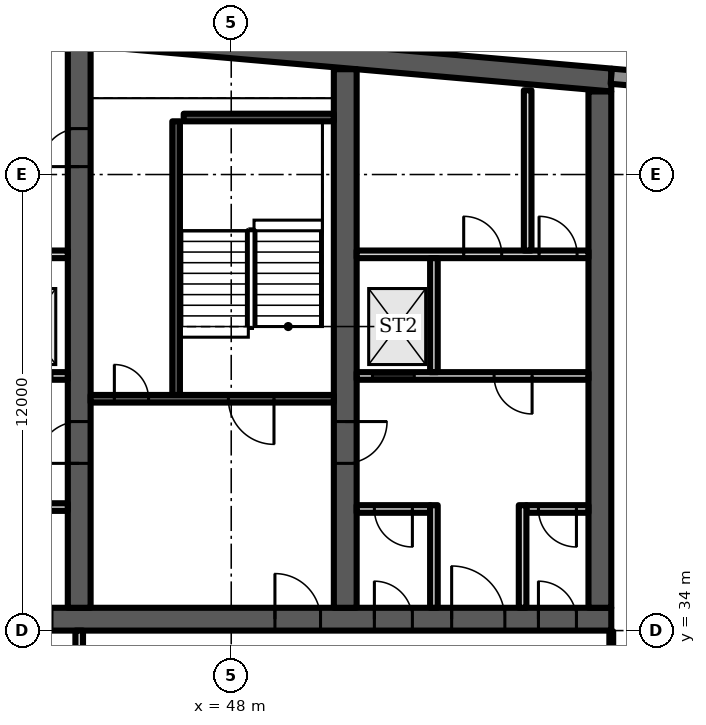
"""IFC4 building model, lengths in metres.
Left out: names, types, materials, properties, quantities, classifications, styles, units other than length and angle.
Written with IfcOpenShell. Run it as: python <this file> out.ifc"""

import sys

from ifc_helpers import new_model, si_unit, direction, frame, frame_2d, origin, place, context, subcontext, project, spatial, polyline, rectangle, outline, extrude, element, fill, save


model = new_model("IFC4")
c1 = context("Model", 3, precision=1e-05, world=origin(), true_north=direction((0.0, 1.0)))
c2 = subcontext(c1, "Body", "Model", "MODEL_VIEW")
j1 = project(units=[si_unit("LENGTHUNIT", "METRE"), si_unit("PLANEANGLEUNIT", "RADIAN")], contexts=[c1])
p1 = place(None, origin())
s1 = spatial("IfcSite", under=j1, at=p1, CompositionType="ELEMENT")
p2 = place(p1, origin())
s2 = spatial("IfcBuilding", under=s1, at=p2, CompositionType="ELEMENT")
p3 = place(p2, frame((0.0, 0.0, 207.1)))
s3 = spatial("IfcBuildingStorey", under=s2, at=p3, CompositionType="ELEMENT", Elevation=207.1)
p4 = place(p3, frame((0.0, 0.0, -0.0)))
e1 = element("IfcWall", 1, at=p4, inside=s3, PredefinedType="SHEAR", context=c2, shape_type="SweptSolid", body=[
    extrude(outline(polyline([(23.0, 48.185), (40.5, 49.716), (58.0, 48.185), (58.0, 48.787), (40.5, 50.318), (23.0, 48.787), (23.0, 48.185)])), origin(), (0.0, 0.0, 1.0), 3.6),
])
p5 = place(p3, frame((23.0, 34.3, 0.0), z_axis=(0.0, 0.0, 1.0), x_axis=(1.0, 0.0, 0.0)))
e2 = element("IfcWall", 2, at=p5, inside=s3, PredefinedType="SHEAR", context=c2, shape_type="SweptSolid", body=[
    extrude(rectangle(XDim=35.0, YDim=0.6, at=frame_2d((17.5, 0.0))), origin(), (0.0, 0.0, 1.0), 3.6),
])
p6 = place(p5, frame((0.65, 0.0, 0.0)))
e3 = element("IfcOpeningElement", 3, at=p6, cuts=e2, PredefinedType="OPENING", context=c2, shape_type="SweptSolid", body=[
    extrude(rectangle(XDim=1.2, YDim=2.1, at=frame_2d((0.6, 1.05))), frame((0.0, 0.31, 0.0), z_axis=(0.0, -1.0, 0.0), x_axis=(1.0, 0.0, 0.0)), (0.0, 0.0, 1.0), 0.62),
])
p7 = place(p5, frame((7.717, 0.0, 0.0)))
e4 = element("IfcOpeningElement", 4, at=p7, cuts=e2, PredefinedType="OPENING", context=c2, shape_type="SweptSolid", body=[
    extrude(rectangle(XDim=1.1, YDim=2.1, at=frame_2d((0.55, 1.05))), frame((0.0, 0.31, 0.0), z_axis=(0.0, -1.0, 0.0), x_axis=(1.0, 0.0, 0.0)), (0.0, 0.0, 1.0), 0.62),
])
p8 = place(p5, frame((12.183, 0.0, 0.0)))
e5 = element("IfcOpeningElement", 5, at=p8, cuts=e2, PredefinedType="OPENING", context=c2, shape_type="SweptSolid", body=[
    extrude(rectangle(XDim=1.1, YDim=2.1, at=frame_2d((0.55, 1.05))), frame((0.0, 0.31, 0.0), z_axis=(0.0, -1.0, 0.0), x_axis=(1.0, 0.0, 0.0)), (0.0, 0.0, 1.0), 0.62),
])
p9 = place(p5, frame((9.8, 0.0, 0.0)))
e6 = element("IfcOpeningElement", 6, at=p9, cuts=e2, PredefinedType="OPENING", context=c2, shape_type="SweptSolid", body=[
    extrude(rectangle(XDim=1.4, YDim=2.1, at=frame_2d((0.7, 1.05))), frame((0.0, 0.31, 0.0), z_axis=(0.0, -1.0, 0.0), x_axis=(1.0, 0.0, 0.0)), (0.0, 0.0, 1.0), 0.62),
])
p10 = place(p5, frame((14.717, 0.0, 0.0)))
e7 = element("IfcOpeningElement", 7, at=p10, cuts=e2, PredefinedType="OPENING", context=c2, shape_type="SweptSolid", body=[
    extrude(rectangle(XDim=1.1, YDim=2.1, at=frame_2d((0.55, 1.05))), frame((0.0, 0.31, 0.0), z_axis=(0.0, -1.0, 0.0), x_axis=(1.0, 0.0, 0.0)), (0.0, 0.0, 1.0), 0.62),
])
p11 = place(p5, frame((16.95, 0.0, 0.0)))
e8 = element("IfcOpeningElement", 8, at=p11, cuts=e2, PredefinedType="OPENING", context=c2, shape_type="SweptSolid", body=[
    extrude(rectangle(XDim=1.1, YDim=2.1, at=frame_2d((0.55, 1.05))), frame((0.0, 0.31, 0.0), z_axis=(0.0, -1.0, 0.0), x_axis=(1.0, 0.0, 0.0)), (0.0, 0.0, 1.0), 0.62),
])
p12 = place(p5, frame((19.183, 0.0, 0.0)))
e9 = element("IfcOpeningElement", 9, at=p12, cuts=e2, PredefinedType="OPENING", context=c2, shape_type="SweptSolid", body=[
    extrude(rectangle(XDim=1.1, YDim=2.1, at=frame_2d((0.55, 1.05))), frame((0.0, 0.31, 0.0), z_axis=(0.0, -1.0, 0.0), x_axis=(1.0, 0.0, 0.0)), (0.0, 0.0, 1.0), 0.62),
])
p13 = place(p5, frame((26.15, 0.0, 0.0)))
e10 = element("IfcOpeningElement", 10, at=p13, cuts=e2, PredefinedType="OPENING", context=c2, shape_type="SweptSolid", body=[
    extrude(rectangle(XDim=1.2, YDim=2.1, at=frame_2d((0.6, 1.05))), frame((0.0, 0.31, 0.0), z_axis=(0.0, -1.0, 0.0), x_axis=(1.0, 0.0, 0.0)), (0.0, 0.0, 1.0), 0.62),
])
p14 = place(p5, frame((28.767, 0.0, 0.0)))
e11 = element("IfcOpeningElement", 11, at=p14, cuts=e2, PredefinedType="OPENING", context=c2, shape_type="SweptSolid", body=[
    extrude(rectangle(XDim=1.0, YDim=2.1, at=frame_2d((0.5, 1.05))), frame((0.0, 0.31, 0.0), z_axis=(0.0, -1.0, 0.0), x_axis=(1.0, 0.0, 0.0)), (0.0, 0.0, 1.0), 0.62),
])
p15 = place(p5, frame((33.083, 0.0, 0.0)))
e12 = element("IfcOpeningElement", 12, at=p15, cuts=e2, PredefinedType="OPENING", context=c2, shape_type="SweptSolid", body=[
    extrude(rectangle(XDim=1.0, YDim=2.1, at=frame_2d((0.5, 1.05))), frame((0.0, 0.31, 0.0), z_axis=(0.0, -1.0, 0.0), x_axis=(1.0, 0.0, 0.0)), (0.0, 0.0, 1.0), 0.62),
])
p16 = place(p5, frame((30.8, 0.0, 0.0)))
e13 = element("IfcOpeningElement", 13, at=p16, cuts=e2, PredefinedType="OPENING", context=c2, shape_type="SweptSolid", body=[
    extrude(rectangle(XDim=1.4, YDim=2.1, at=frame_2d((0.7, 1.05))), frame((0.0, 0.31, 0.0), z_axis=(0.0, -1.0, 0.0), x_axis=(1.0, 0.0, 0.0)), (0.0, 0.0, 1.0), 0.62),
])
p17 = place(p3, frame((44.0, 34.6, 0.0), z_axis=(0.0, 0.0, 1.0), x_axis=(0.0, 1.0, 0.0)))
e14 = element("IfcWall", 14, at=p17, inside=s3, PredefinedType="SHEAR", context=c2, shape_type="SweptSolid", body=[
    extrude(rectangle(XDim=14.784, YDim=0.6, at=frame_2d((7.392, 0.0))), origin(), (0.0, 0.0, 1.0), 3.6),
])
p18 = place(p17, frame((11.608, 0.0, 0.0)))
e15 = element("IfcOpeningElement", 15, at=p18, cuts=e14, PredefinedType="OPENING", context=c2, shape_type="SweptSolid", body=[
    extrude(rectangle(XDim=1.0, YDim=2.1, at=frame_2d((0.5, 1.05))), frame((0.0, 0.31, 0.0), z_axis=(0.0, -1.0, 0.0), x_axis=(1.0, 0.0, 0.0)), (0.0, 0.0, 1.0), 0.62),
])
p19 = place(p17, frame((3.8, 0.0, 0.0)))
e16 = element("IfcOpeningElement", 16, at=p19, cuts=e14, PredefinedType="OPENING", context=c2, shape_type="SweptSolid", body=[
    extrude(rectangle(XDim=1.1, YDim=2.1, at=frame_2d((0.55, 1.05))), frame((0.0, 0.31, 0.0), z_axis=(0.0, -1.0, 0.0), x_axis=(1.0, 0.0, 0.0)), (0.0, 0.0, 1.0), 0.62),
])
p20 = place(p3, frame((51.0, 34.6, 0.0), z_axis=(0.0, 0.0, 1.0), x_axis=(0.0, 1.0, 0.0)))
e17 = element("IfcWall", 17, at=p20, inside=s3, PredefinedType="SHEAR", context=c2, shape_type="SweptSolid", body=[
    extrude(rectangle(XDim=14.171, YDim=0.6, at=frame_2d((7.085, 0.0))), origin(), (0.0, 0.0, 1.0), 3.6),
])
p21 = place(p20, frame((3.8, 0.0, 0.0)))
e18 = element("IfcOpeningElement", 18, at=p21, cuts=e17, PredefinedType="OPENING", context=c2, shape_type="SweptSolid", body=[
    extrude(rectangle(XDim=1.1, YDim=2.1, at=frame_2d((0.55, 1.05))), frame((0.0, 0.31, 0.0), z_axis=(0.0, -1.0, 0.0), x_axis=(1.0, 0.0, 0.0)), (0.0, 0.0, 1.0), 0.62),
])
p22 = place(p3, frame((57.7, 34.6, 0.0), z_axis=(0.0, 0.0, 1.0), x_axis=(0.0, 1.0, 0.0)))
e19 = element("IfcWall", 19, at=p22, inside=s3, PredefinedType="SHEAR", context=c2, shape_type="SweptSolid", body=[
    extrude(rectangle(XDim=13.585, YDim=0.6, at=frame_2d((6.792, 0.0))), origin(), (0.0, 0.0, 1.0), 3.6),
])
p23 = place(p3, frame((60.983, 48.326, 0.0), z_axis=(0.0, 0.0, 1.0), x_axis=(-0.996194, 0.087168, 0.0)))
e20 = element("IfcWall", 20, at=p23, inside=s3, PredefinedType="SOLIDWALL", context=c2, shape_type="SweptSolid", body=[
    extrude(rectangle(XDim=2.994, YDim=0.4, at=frame_2d((1.497, 0.0))), origin(), (0.0, 0.0, 1.0), 3.2),
])
p24 = place(p3, frame((37.3, 40.7, 0.0), z_axis=(0.0, 0.0, 1.0), x_axis=(1.0, 0.0, 0.0)))
e21 = element("IfcWall", 21, at=p24, inside=s3, PredefinedType="PARTITIONING", context=c2, shape_type="SweptSolid", body=[
    extrude(rectangle(XDim=6.4, YDim=0.2, at=frame_2d((3.2, 0.0))), origin(), (0.0, 0.0, 1.0), 3.2),
])
p25 = place(p24, frame((0.417, 0.0, 0.0)))
e22 = element("IfcOpeningElement", 22, at=p25, cuts=e21, PredefinedType="OPENING", context=c2, shape_type="SweptSolid", body=[
    extrude(rectangle(XDim=1.1, YDim=2.1, at=frame_2d((0.55, 1.05))), frame((0.0, 0.11, 0.0), z_axis=(0.0, -1.0, 0.0), x_axis=(1.0, 0.0, 0.0)), (0.0, 0.0, 1.0), 0.22),
])
p26 = place(p24, frame((2.65, 0.0, 0.0)))
e23 = element("IfcOpeningElement", 23, at=p26, cuts=e21, PredefinedType="OPENING", context=c2, shape_type="SweptSolid", body=[
    extrude(rectangle(XDim=1.1, YDim=2.1, at=frame_2d((0.55, 1.05))), frame((0.0, 0.11, 0.0), z_axis=(0.0, -1.0, 0.0), x_axis=(1.0, 0.0, 0.0)), (0.0, 0.0, 1.0), 0.22),
])
p27 = place(p24, frame((4.883, 0.0, 0.0)))
e24 = element("IfcOpeningElement", 24, at=p27, cuts=e21, PredefinedType="OPENING", context=c2, shape_type="SweptSolid", body=[
    extrude(rectangle(XDim=1.1, YDim=2.1, at=frame_2d((0.55, 1.05))), frame((0.0, 0.11, 0.0), z_axis=(0.0, -1.0, 0.0), x_axis=(1.0, 0.0, 0.0)), (0.0, 0.0, 1.0), 0.22),
])
p28 = place(p3, frame((0.0, 0.0, -0.0)))
e25 = element("IfcWall", 25, at=p28, inside=s3, PredefinedType="PARTITIONING", context=c2, shape_type="SweptSolid", body=[
    extrude(outline(polyline([(41.567, 37.1), (39.433, 37.1), (39.433, 34.6), (39.233, 34.6), (39.233, 37.45), (37.3, 37.45), (37.3, 37.65), (39.233, 37.65), (39.433, 37.65), (39.433, 37.3), (41.567, 37.3), (41.567, 37.35), (41.767, 37.35), (43.7, 37.35), (43.7, 37.15), (41.767, 37.15), (41.767, 34.6), (41.567, 34.6), (41.567, 37.1)])), origin(), (0.0, 0.0, 1.0), 3.2),
])
p29 = place(p3, frame((0.0, 0.0, -0.0)))
e26 = element("IfcWall", 26, at=p29, inside=s3, PredefinedType="PARTITIONING", context=c2, shape_type="SweptSolid", body=[
    extrude(outline(polyline([(39.433, 40.8), (39.233, 40.8), (39.233, 43.8), (37.3, 43.8), (37.3, 44.0), (43.7, 44.0), (43.7, 43.8), (41.767, 43.8), (41.767, 40.8), (41.567, 40.8), (41.567, 43.8), (39.433, 43.8), (39.433, 40.8)])), origin(), (0.0, 0.0, 1.0), 3.2),
])
p30 = place(p3, frame((44.3, 40.1, 0.0), z_axis=(0.0, 0.0, 1.0), x_axis=(1.0, 0.0, 0.0)))
e27 = element("IfcWall", 27, at=p30, inside=s3, PredefinedType="SHEAR", context=c2, shape_type="SweptSolid", body=[
    extrude(rectangle(XDim=6.4, YDim=0.2, at=frame_2d((3.2, 0.0))), origin(), (0.0, 0.0, 1.0), 3.2),
])
p31 = place(p30, frame((3.625, 0.0, 0.0)))
e28 = element("IfcOpeningElement", 28, at=p31, cuts=e27, PredefinedType="OPENING", context=c2, shape_type="SweptSolid", body=[
    extrude(rectangle(XDim=1.2, YDim=2.1, at=frame_2d((0.6, 1.05))), frame((0.0, 0.11, 0.0), z_axis=(0.0, -1.0, 0.0), x_axis=(1.0, 0.0, 0.0)), (0.0, 0.0, 1.0), 0.22),
])
p32 = place(p30, frame((0.625, 0.0, 0.0)))
e29 = element("IfcOpeningElement", 29, at=p32, cuts=e27, PredefinedType="OPENING", context=c2, shape_type="SweptSolid", body=[
    extrude(rectangle(XDim=0.9, YDim=2.1, at=frame_2d((0.45, 1.05))), frame((0.0, 0.11, 0.0), z_axis=(0.0, -1.0, 0.0), x_axis=(1.0, 0.0, 0.0)), (0.0, 0.0, 1.0), 0.22),
])
p33 = place(p3, frame((46.55, 40.2, 0.0), z_axis=(0.0, 0.0, 1.0), x_axis=(0.0, 1.0, 0.0)))
e30 = element("IfcWall", 30, at=p33, inside=s3, PredefinedType="SHEAR", context=c2, shape_type="SweptSolid", body=[
    extrude(rectangle(XDim=7.2, YDim=0.2, at=frame_2d((3.6, 0.0))), origin(), (0.0, 0.0, 1.0), 3.2),
])
p34 = place(p3, frame((46.75, 47.5, 0.0), z_axis=(0.0, 0.0, 1.0), x_axis=(1.0, 0.0, 0.0)))
e31 = element("IfcWall", 31, at=p34, inside=s3, PredefinedType="SHEAR", context=c2, shape_type="SweptSolid", body=[
    extrude(rectangle(XDim=3.95, YDim=0.2, at=frame_2d((1.975, 0.0))), origin(), (0.0, 0.0, 1.0), 3.2),
])
p35 = place(p3, frame((51.3, 37.2, 0.0), z_axis=(0.0, 0.0, 1.0), x_axis=(1.0, 0.0, 0.0)))
e32 = element("IfcWall", 32, at=p35, inside=s3, PredefinedType="PARTITIONING", context=c2, shape_type="SweptSolid", body=[
    extrude(rectangle(XDim=1.933, YDim=0.2, at=frame_2d((0.967, 0.0))), origin(), (0.0, 0.0, 1.0), 3.2),
])
p36 = place(p35, frame((0.467, 0.0, 0.0)))
e33 = element("IfcOpeningElement", 33, at=p36, cuts=e32, PredefinedType="OPENING", context=c2, shape_type="SweptSolid", body=[
    extrude(rectangle(XDim=1.0, YDim=2.1, at=frame_2d((0.5, 1.05))), frame((0.0, 0.11, 0.0), z_axis=(0.0, -1.0, 0.0), x_axis=(1.0, 0.0, 0.0)), (0.0, 0.0, 1.0), 0.22),
])
p37 = place(p3, frame((55.767, 37.2, 0.0), z_axis=(0.0, 0.0, 1.0), x_axis=(1.0, 0.0, 0.0)))
e34 = element("IfcWall", 34, at=p37, inside=s3, PredefinedType="PARTITIONING", context=c2, shape_type="SweptSolid", body=[
    extrude(rectangle(XDim=1.633, YDim=0.2, at=frame_2d((0.817, 0.0))), origin(), (0.0, 0.0, 1.0), 3.2),
])
p38 = place(p37, frame((0.317, 0.0, 0.0)))
e35 = element("IfcOpeningElement", 35, at=p38, cuts=e34, PredefinedType="OPENING", context=c2, shape_type="SweptSolid", body=[
    extrude(rectangle(XDim=1.0, YDim=2.1, at=frame_2d((0.5, 1.05))), frame((0.0, 0.11, 0.0), z_axis=(0.0, -1.0, 0.0), x_axis=(1.0, 0.0, 0.0)), (0.0, 0.0, 1.0), 0.22),
])
p39 = place(p3, frame((51.3, 40.7, 0.0), z_axis=(0.0, 0.0, 1.0), x_axis=(1.0, 0.0, 0.0)))
e36 = element("IfcWall", 36, at=p39, inside=s3, PredefinedType="PARTITIONING", context=c2, shape_type="SweptSolid", body=[
    extrude(rectangle(XDim=6.1, YDim=0.2, at=frame_2d((3.05, 0.0))), origin(), (0.0, 0.0, 1.0), 3.2),
])
p40 = place(p39, frame((0.417, 0.0, 0.0)))
e37 = element("IfcOpeningElement", 37, at=p40, cuts=e36, PredefinedType="OPENING", context=c2, shape_type="SweptSolid", body=[
    extrude(rectangle(XDim=1.1, YDim=2.1, at=frame_2d((0.55, 1.05))), frame((0.0, 0.11, 0.0), z_axis=(0.0, -1.0, 0.0), x_axis=(1.0, 0.0, 0.0)), (0.0, 0.0, 1.0), 0.22),
])
p41 = place(p39, frame((3.617, 0.0, 0.0)))
e38 = element("IfcOpeningElement", 38, at=p41, cuts=e36, PredefinedType="OPENING", context=c2, shape_type="SweptSolid", body=[
    extrude(rectangle(XDim=1.0, YDim=2.1, at=frame_2d((0.5, 1.05))), frame((0.0, 0.11, 0.0), z_axis=(0.0, -1.0, 0.0), x_axis=(1.0, 0.0, 0.0)), (0.0, 0.0, 1.0), 0.22),
])
p42 = place(p3, frame((51.3, 43.9, 0.0), z_axis=(0.0, 0.0, 1.0), x_axis=(1.0, 0.0, 0.0)))
e39 = element("IfcWall", 39, at=p42, inside=s3, PredefinedType="PARTITIONING", context=c2, shape_type="SweptSolid", body=[
    extrude(rectangle(XDim=6.1, YDim=0.2, at=frame_2d((3.05, 0.0))), origin(), (0.0, 0.0, 1.0), 3.2),
])
p43 = place(p42, frame((2.817, 0.0, 0.0)))
e40 = element("IfcOpeningElement", 40, at=p43, cuts=e39, PredefinedType="OPENING", context=c2, shape_type="SweptSolid", body=[
    extrude(rectangle(XDim=1.0, YDim=2.1, at=frame_2d((0.5, 1.05))), frame((0.0, 0.11, 0.0), z_axis=(0.0, -1.0, 0.0), x_axis=(1.0, 0.0, 0.0)), (0.0, 0.0, 1.0), 0.22),
])
p44 = place(p42, frame((4.8, 0.0, 0.0)))
e41 = element("IfcOpeningElement", 41, at=p44, cuts=e39, PredefinedType="OPENING", context=c2, shape_type="SweptSolid", body=[
    extrude(rectangle(XDim=1.0, YDim=2.1, at=frame_2d((0.5, 1.05))), frame((0.0, 0.11, 0.0), z_axis=(0.0, -1.0, 0.0), x_axis=(1.0, 0.0, 0.0)), (0.0, 0.0, 1.0), 0.22),
])
p45 = place(p3, frame((0.0, 0.0, -0.0)))
e42 = element("IfcWall", 42, at=p45, inside=s3, PredefinedType="PARTITIONING", context=c2, shape_type="SweptSolid", body=[
    extrude(outline(polyline([(53.233, 34.6), (53.233, 37.3), (53.433, 37.3), (53.433, 34.6), (53.233, 34.6)])), origin(), (0.0, 0.0, 1.0), 3.2),
])
p46 = place(p3, frame((0.0, 0.0, -0.0)))
e43 = element("IfcWall", 43, at=p46, inside=s3, PredefinedType="PARTITIONING", context=c2, shape_type="SweptSolid", body=[
    extrude(outline(polyline([(55.567, 34.6), (55.567, 37.3), (55.767, 37.3), (55.767, 34.6), (55.567, 34.6)])), origin(), (0.0, 0.0, 1.0), 3.2),
])
p47 = place(p3, frame((0.0, 0.0, -0.0)))
e44 = element("IfcWall", 44, at=p47, inside=s3, PredefinedType="PARTITIONING", context=c2, shape_type="SweptSolid", body=[
    extrude(outline(polyline([(53.433, 40.8), (53.433, 43.8), (53.233, 43.8), (53.233, 40.8), (53.433, 40.8)])), origin(), (0.0, 0.0, 1.0), 3.2),
])
p48 = place(p3, frame((55.8, 44.0, 0.0), z_axis=(0.0, 0.0, 1.0), x_axis=(0.0, 1.0, 0.0)))
e45 = element("IfcWall", 45, at=p48, inside=s3, PredefinedType="PARTITIONING", context=c2, shape_type="SweptSolid", body=[
    extrude(rectangle(XDim=4.218, YDim=0.2, at=frame_2d((2.109, 0.0))), origin(), (0.0, 0.0, 1.0), 3.2),
])
p49 = place(p3, frame((44.0, 30.5, 0.0), z_axis=(0.0, 0.0, 1.0), x_axis=(0.0, 1.0, 0.0)))
e46 = element("IfcWall", 46, at=p49, inside=s3, PredefinedType="PARTITIONING", context=c2, shape_type="SweptSolid", body=[
    extrude(rectangle(XDim=3.5, YDim=0.2, at=frame_2d((1.75, 0.0))), origin(), (0.0, 0.0, 1.0), 3.2),
])
p50 = place(p49, frame((1.2, 0.0, 0.0)))
e47 = element("IfcOpeningElement", 47, at=p50, cuts=e46, PredefinedType="OPENING", context=c2, shape_type="SweptSolid", body=[
    extrude(rectangle(XDim=1.1, YDim=2.1, at=frame_2d((0.55, 1.05))), frame((0.0, 0.11, 0.0), z_axis=(0.0, -1.0, 0.0), x_axis=(1.0, 0.0, 0.0)), (0.0, 0.0, 1.0), 0.22),
])
p51 = place(p3, frame((58.0, 30.5, 0.0), z_axis=(0.0, 0.0, 1.0), x_axis=(0.0, 1.0, 0.0)))
e48 = element("IfcWall", 48, at=p51, inside=s3, PredefinedType="PARTITIONING", context=c2, shape_type="SweptSolid", body=[
    extrude(rectangle(XDim=3.48, YDim=0.1, at=frame_2d((1.74, 0.0))), origin(), (0.0, 0.0, 1.0), 3.2),
])
p52 = place(p18, origin())
e49 = element("IfcDoor", 49, at=p52, inside=s3, OperationType="SINGLE_SWING_LEFT", PredefinedType="DOOR", context=c2, shape_type="SweptSolid", body=[
    extrude(rectangle(XDim=1.0, YDim=2.1, at=frame_2d((0.5, 1.05))), frame((0.0, 0.025, 0.0), z_axis=(0.0, -1.0, 0.0), x_axis=(1.0, 0.0, 0.0)), (0.0, 0.0, 1.0), 0.05),
])
fill(e15, e49)
p53 = place(p31, origin())
e50 = element("IfcDoor", 50, at=p53, inside=s3, OperationType="SINGLE_SWING_RIGHT", PredefinedType="DOOR", context=c2, shape_type="SweptSolid", body=[
    extrude(rectangle(XDim=1.2, YDim=2.1, at=frame_2d((0.6, 1.05))), frame((0.0, 0.025, 0.0), z_axis=(0.0, -1.0, 0.0), x_axis=(1.0, 0.0, 0.0)), (0.0, 0.0, 1.0), 0.05),
])
fill(e28, e50)
p54 = place(p32, origin())
e51 = element("IfcDoor", 51, at=p54, inside=s3, OperationType="SINGLE_SWING_LEFT", PredefinedType="DOOR", context=c2, shape_type="SweptSolid", body=[
    extrude(rectangle(XDim=0.9, YDim=2.1, at=frame_2d((0.45, 1.05))), frame((0.0, 0.025, 0.0), z_axis=(0.0, -1.0, 0.0), x_axis=(1.0, 0.0, 0.0)), (0.0, 0.0, 1.0), 0.05),
])
fill(e29, e51)
p55 = place(p13, origin())
e52 = element("IfcDoor", 52, at=p55, inside=s3, OperationType="SINGLE_SWING_LEFT", PredefinedType="DOOR", context=c2, shape_type="SweptSolid", body=[
    extrude(rectangle(XDim=1.2, YDim=2.1, at=frame_2d((0.6, 1.05))), frame((0.0, 0.025, 0.0), z_axis=(0.0, -1.0, 0.0), x_axis=(1.0, 0.0, 0.0)), (0.0, 0.0, 1.0), 0.05),
])
fill(e10, e52)
p56 = place(p14, origin())
e53 = element("IfcDoor", 53, at=p56, inside=s3, OperationType="SINGLE_SWING_LEFT", PredefinedType="DOOR", context=c2, shape_type="SweptSolid", body=[
    extrude(rectangle(XDim=1.0, YDim=2.1, at=frame_2d((0.5, 1.05))), frame((0.0, 0.025, 0.0), z_axis=(0.0, -1.0, 0.0), x_axis=(1.0, 0.0, 0.0)), (0.0, 0.0, 1.0), 0.05),
])
fill(e11, e53)
p57 = place(p36, origin())
e54 = element("IfcDoor", 54, at=p57, inside=s3, OperationType="SINGLE_SWING_RIGHT", PredefinedType="DOOR", context=c2, shape_type="SweptSolid", body=[
    extrude(rectangle(XDim=1.0, YDim=2.1, at=frame_2d((0.5, 1.05))), frame((0.0, 0.025, 0.0), z_axis=(0.0, -1.0, 0.0), x_axis=(1.0, 0.0, 0.0)), (0.0, 0.0, 1.0), 0.05),
])
fill(e33, e54)
p58 = place(p15, origin())
e55 = element("IfcDoor", 55, at=p58, inside=s3, OperationType="SINGLE_SWING_LEFT", PredefinedType="DOOR", context=c2, shape_type="SweptSolid", body=[
    extrude(rectangle(XDim=1.0, YDim=2.1, at=frame_2d((0.5, 1.05))), frame((0.0, 0.025, 0.0), z_axis=(0.0, -1.0, 0.0), x_axis=(1.0, 0.0, 0.0)), (0.0, 0.0, 1.0), 0.05),
])
fill(e12, e55)
p59 = place(p38, origin())
e56 = element("IfcDoor", 56, at=p59, inside=s3, OperationType="SINGLE_SWING_RIGHT", PredefinedType="DOOR", context=c2, shape_type="SweptSolid", body=[
    extrude(rectangle(XDim=1.0, YDim=2.1, at=frame_2d((0.5, 1.05))), frame((0.0, 0.025, 0.0), z_axis=(0.0, -1.0, 0.0), x_axis=(1.0, 0.0, 0.0)), (0.0, 0.0, 1.0), 0.05),
])
fill(e35, e56)
p60 = place(p16, origin())
e57 = element("IfcDoor", 57, at=p60, inside=s3, OperationType="DOUBLE_DOOR_SINGLE_SWING", PredefinedType="DOOR", context=c2, shape_type="SweptSolid", body=[
    extrude(rectangle(XDim=1.4, YDim=2.1, at=frame_2d((0.7, 1.05))), frame((0.0, 0.025, 0.0), z_axis=(0.0, -1.0, 0.0), x_axis=(1.0, 0.0, 0.0)), (0.0, 0.0, 1.0), 0.05),
])
fill(e13, e57)
p61 = place(p40, origin())
e58 = element("IfcDoor", 58, at=p61, inside=s3, OperationType="DOUBLE_DOOR_SLIDING", PredefinedType="DOOR", context=c2, shape_type="SweptSolid", body=[
    extrude(rectangle(XDim=1.1, YDim=2.1, at=frame_2d((0.55, 1.05))), frame((0.0, 0.025, 0.0), z_axis=(0.0, -1.0, 0.0), x_axis=(1.0, 0.0, 0.0)), (0.0, 0.0, 1.0), 0.05),
])
fill(e37, e58)
p62 = place(p41, origin())
e59 = element("IfcDoor", 59, at=p62, inside=s3, OperationType="SINGLE_SWING_RIGHT", PredefinedType="DOOR", context=c2, shape_type="SweptSolid", body=[
    extrude(rectangle(XDim=1.0, YDim=2.1, at=frame_2d((0.5, 1.05))), frame((0.0, 0.025, 0.0), z_axis=(0.0, -1.0, 0.0), x_axis=(1.0, 0.0, 0.0)), (0.0, 0.0, 1.0), 0.05),
])
fill(e38, e59)
p63 = place(p43, origin())
e60 = element("IfcDoor", 60, at=p63, inside=s3, OperationType="SINGLE_SWING_LEFT", PredefinedType="DOOR", context=c2, shape_type="SweptSolid", body=[
    extrude(rectangle(XDim=1.0, YDim=2.1, at=frame_2d((0.5, 1.05))), frame((0.0, 0.025, 0.0), z_axis=(0.0, -1.0, 0.0), x_axis=(1.0, 0.0, 0.0)), (0.0, 0.0, 1.0), 0.05),
])
fill(e40, e60)
p64 = place(p44, origin())
e61 = element("IfcDoor", 61, at=p64, inside=s3, OperationType="SINGLE_SWING_LEFT", PredefinedType="DOOR", context=c2, shape_type="SweptSolid", body=[
    extrude(rectangle(XDim=1.0, YDim=2.1, at=frame_2d((0.5, 1.05))), frame((0.0, 0.025, 0.0), z_axis=(0.0, -1.0, 0.0), x_axis=(1.0, 0.0, 0.0)), (0.0, 0.0, 1.0), 0.05),
])
fill(e41, e61)
p65 = place(p19, origin())
e62 = element("IfcDoor", 62, at=p65, inside=s3, OperationType="SINGLE_SWING_LEFT", PredefinedType="DOOR", context=c2, shape_type="SweptSolid", body=[
    extrude(rectangle(XDim=1.1, YDim=2.1, at=frame_2d((0.55, 1.05))), frame((0.0, 0.025, 0.0), z_axis=(0.0, -1.0, 0.0), x_axis=(1.0, 0.0, 0.0)), (0.0, 0.0, 1.0), 0.05),
])
fill(e16, e62)
p66 = place(p21, origin())
e63 = element("IfcDoor", 63, at=p66, inside=s3, OperationType="SINGLE_SWING_RIGHT", PredefinedType="DOOR", context=c2, shape_type="SweptSolid", body=[
    extrude(rectangle(XDim=1.1, YDim=2.1, at=frame_2d((0.55, 1.05))), frame((0.0, 0.025, 0.0), z_axis=(0.0, -1.0, 0.0), x_axis=(1.0, 0.0, 0.0)), (0.0, 0.0, 1.0), 0.05),
])
fill(e18, e63)
save(model, sys.argv[1])
